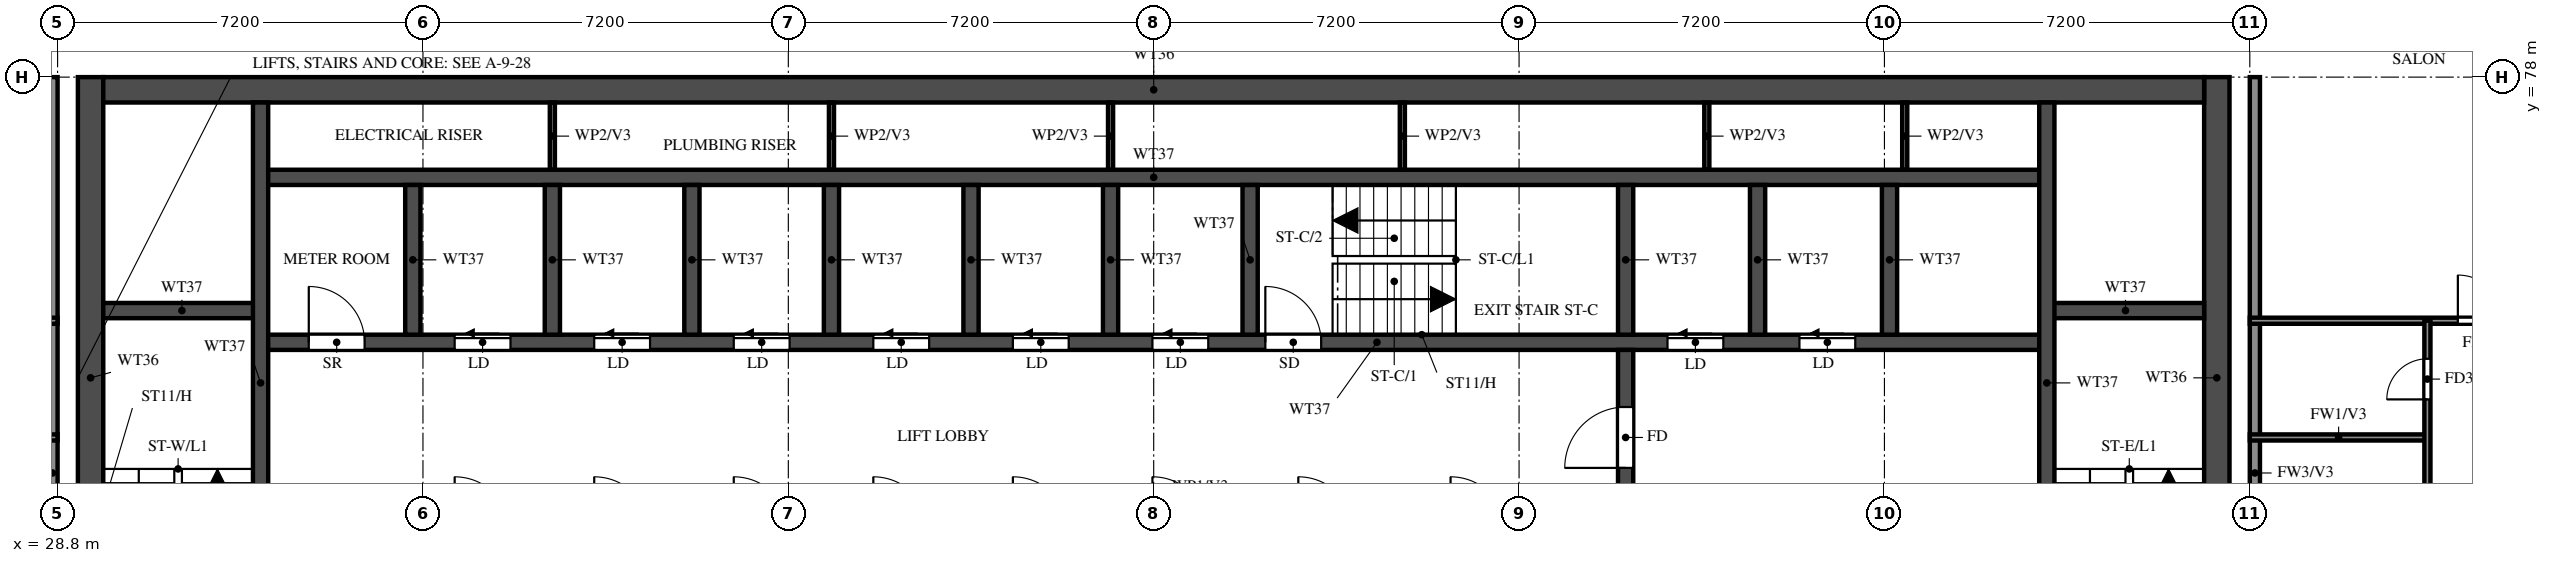
"""IFC4 building model, lengths in metres.
Left out: names, types, materials, properties, quantities, classifications, styles, units other than length and angle.
Written with IfcOpenShell. Run it as: python <this file> out.ifc"""

import sys

from ifc_helpers import new_model, si_unit, direction, frame, frame_2d, origin, place, context, subcontext, project, spatial, rectangle, extrude, element, fill, save


model = new_model("IFC4")
c1 = context("Model", 3, precision=1e-05, world=origin(), true_north=direction((0.0, 1.0)))
c2 = subcontext(c1, "Body", "Model", "MODEL_VIEW")
j1 = project(units=[si_unit("LENGTHUNIT", "METRE"), si_unit("PLANEANGLEUNIT", "RADIAN")], contexts=[c1])
p1 = place(None, origin())
s1 = spatial("IfcSite", under=j1, at=p1, CompositionType="ELEMENT")
p2 = place(p1, origin())
s2 = spatial("IfcBuilding", under=s1, at=p2, CompositionType="ELEMENT")
p3 = place(p2, frame((0.0, 0.0, 211.5)))
s3 = spatial("IfcBuildingStorey", under=s2, at=p3, CompositionType="ELEMENT", Elevation=211.5)
for number, where, z_axis, x_axis in (
    (1, (29.45, 66.15, 0.0), (0.0, 0.0, 1.0), (0.0, 1.0, 0.0)),
    (2, (71.35, 66.15, 0.0), (0.0, 0.0, 1.0), (0.0, 1.0, 0.0)),
):
    element("IfcWall", number, at=place(p3, frame(where, z_axis=z_axis, x_axis=x_axis)), inside=s3, PredefinedType="SHEAR", context=c2, shape_type="SweptSolid", body=[
        extrude(rectangle(XDim=11.85, YDim=0.5, at=frame_2d((5.925, 0.0))), origin(), (0.0, 0.0, 1.0), 3.22),
    ])
p4 = place(p3, frame((29.7, 77.75, 0.0), z_axis=(0.0, 0.0, 1.0), x_axis=(1.0, 0.0, 0.0)))
e3 = element("IfcWall", 3, at=p4, inside=s3, PredefinedType="SHEAR", context=c2, shape_type="SweptSolid", body=[
    extrude(rectangle(XDim=41.4, YDim=0.5, at=frame_2d((20.7, 0.0))), origin(), (0.0, 0.0, 1.0), 3.22),
])
p5 = place(p3, frame((32.8, 72.775, 0.0), z_axis=(0.0, 0.0, 1.0), x_axis=(1.0, 0.0, 0.0)))
e4 = element("IfcWall", 4, at=p5, inside=s3, PredefinedType="SHEAR", context=c2, shape_type="SweptSolid", body=[
    extrude(rectangle(XDim=35.2, YDim=0.3, at=frame_2d((17.6, 0.0))), origin(), (0.0, 0.0, 1.0), 3.22),
])
p6 = place(p5, frame((19.8, 0.0, 0.0)))
e5 = element("IfcOpeningElement", 5, at=p6, cuts=e4, PredefinedType="OPENING", context=c2, shape_type="SweptSolid", body=[
    extrude(rectangle(XDim=1.1, YDim=2.1, at=frame_2d((0.55, 1.05))), frame((0.0, 0.16, 0.0), z_axis=(0.0, -1.0, 0.0), x_axis=(1.0, 0.0, 0.0)), (0.0, 0.0, 1.0), 0.32),
])
p7 = place(p5, frame((27.725, 0.0, 0.0)))
e6 = element("IfcOpeningElement", 6, at=p7, cuts=e4, PredefinedType="OPENING", context=c2, shape_type="SweptSolid", body=[
    extrude(rectangle(XDim=1.1, YDim=2.1, at=frame_2d((0.55, 1.05))), frame((0.0, 0.16, 0.0), z_axis=(0.0, -1.0, 0.0), x_axis=(1.0, 0.0, 0.0)), (0.0, 0.0, 1.0), 0.32),
])
p8 = place(p5, frame((30.325, 0.0, 0.0)))
e7 = element("IfcOpeningElement", 7, at=p8, cuts=e4, PredefinedType="OPENING", context=c2, shape_type="SweptSolid", body=[
    extrude(rectangle(XDim=1.1, YDim=2.1, at=frame_2d((0.55, 1.05))), frame((0.0, 0.16, 0.0), z_axis=(0.0, -1.0, 0.0), x_axis=(1.0, 0.0, 0.0)), (0.0, 0.0, 1.0), 0.32),
])
p9 = place(p5, frame((3.825, 0.0, 0.0)))
e8 = element("IfcOpeningElement", 8, at=p9, cuts=e4, PredefinedType="OPENING", context=c2, shape_type="SweptSolid", body=[
    extrude(rectangle(XDim=1.1, YDim=2.1, at=frame_2d((0.55, 1.05))), frame((0.0, 0.16, 0.0), z_axis=(0.0, -1.0, 0.0), x_axis=(1.0, 0.0, 0.0)), (0.0, 0.0, 1.0), 0.32),
])
p10 = place(p5, frame((6.575, 0.0, 0.0)))
e9 = element("IfcOpeningElement", 9, at=p10, cuts=e4, PredefinedType="OPENING", context=c2, shape_type="SweptSolid", body=[
    extrude(rectangle(XDim=1.1, YDim=2.1, at=frame_2d((0.55, 1.05))), frame((0.0, 0.16, 0.0), z_axis=(0.0, -1.0, 0.0), x_axis=(1.0, 0.0, 0.0)), (0.0, 0.0, 1.0), 0.32),
])
p11 = place(p5, frame((9.325, 0.0, 0.0)))
e10 = element("IfcOpeningElement", 10, at=p11, cuts=e4, PredefinedType="OPENING", context=c2, shape_type="SweptSolid", body=[
    extrude(rectangle(XDim=1.1, YDim=2.1, at=frame_2d((0.55, 1.05))), frame((0.0, 0.16, 0.0), z_axis=(0.0, -1.0, 0.0), x_axis=(1.0, 0.0, 0.0)), (0.0, 0.0, 1.0), 0.32),
])
p12 = place(p5, frame((12.075, 0.0, 0.0)))
e11 = element("IfcOpeningElement", 11, at=p12, cuts=e4, PredefinedType="OPENING", context=c2, shape_type="SweptSolid", body=[
    extrude(rectangle(XDim=1.1, YDim=2.1, at=frame_2d((0.55, 1.05))), frame((0.0, 0.16, 0.0), z_axis=(0.0, -1.0, 0.0), x_axis=(1.0, 0.0, 0.0)), (0.0, 0.0, 1.0), 0.32),
])
p13 = place(p5, frame((14.825, 0.0, 0.0)))
e12 = element("IfcOpeningElement", 12, at=p13, cuts=e4, PredefinedType="OPENING", context=c2, shape_type="SweptSolid", body=[
    extrude(rectangle(XDim=1.1, YDim=2.1, at=frame_2d((0.55, 1.05))), frame((0.0, 0.16, 0.0), z_axis=(0.0, -1.0, 0.0), x_axis=(1.0, 0.0, 0.0)), (0.0, 0.0, 1.0), 0.32),
])
p14 = place(p5, frame((17.575, 0.0, 0.0)))
e13 = element("IfcOpeningElement", 13, at=p14, cuts=e4, PredefinedType="OPENING", context=c2, shape_type="SweptSolid", body=[
    extrude(rectangle(XDim=1.1, YDim=2.1, at=frame_2d((0.55, 1.05))), frame((0.0, 0.16, 0.0), z_axis=(0.0, -1.0, 0.0), x_axis=(1.0, 0.0, 0.0)), (0.0, 0.0, 1.0), 0.32),
])
p15 = place(p5, frame((0.95, 0.0, 0.0)))
e14 = element("IfcOpeningElement", 14, at=p15, cuts=e4, PredefinedType="OPENING", context=c2, shape_type="SweptSolid", body=[
    extrude(rectangle(XDim=1.1, YDim=2.1, at=frame_2d((0.55, 1.05))), frame((0.0, 0.16, 0.0), z_axis=(0.0, -1.0, 0.0), x_axis=(1.0, 0.0, 0.0)), (0.0, 0.0, 1.0), 0.32),
])
p16 = place(p3, frame((32.8, 76.025, 0.0), z_axis=(0.0, 0.0, 1.0), x_axis=(1.0, 0.0, 0.0)))
e15 = element("IfcWall", 15, at=p16, inside=s3, PredefinedType="SHEAR", context=c2, shape_type="SweptSolid", body=[
    extrude(rectangle(XDim=35.2, YDim=0.3, at=frame_2d((17.6, 0.0))), origin(), (0.0, 0.0, 1.0), 3.22),
])
for number, where, z_axis, x_axis in (
    (16, (29.7, 73.4, 0.0), (0.0, 0.0, 1.0), (1.0, 0.0, 0.0)),
    (17, (68.0, 73.4, 0.0), (0.0, 0.0, 1.0), (1.0, 0.0, 0.0)),
):
    element("IfcWall", number, at=place(p3, frame(where, z_axis=z_axis, x_axis=x_axis)), inside=s3, PredefinedType="SHEAR", context=c2, shape_type="SweptSolid", body=[
        extrude(rectangle(XDim=3.1, YDim=0.3, at=frame_2d((1.55, 0.0))), origin(), (0.0, 0.0, 1.0), 3.22),
    ])
p17 = place(p3, frame((32.8, 66.45, 0.0), z_axis=(0.0, 0.0, 1.0), x_axis=(0.0, 1.0, 0.0)))
e18 = element("IfcWall", 18, at=p17, inside=s3, PredefinedType="SHEAR", context=c2, shape_type="SweptSolid", body=[
    extrude(rectangle(XDim=11.05, YDim=0.3, at=frame_2d((5.525, 0.0))), origin(), (0.0, 0.0, 1.0), 3.22),
])
p18 = place(p3, frame((68.0, 66.45, 0.0), z_axis=(0.0, 0.0, 1.0), x_axis=(0.0, 1.0, 0.0)))
e19 = element("IfcWall", 19, at=p18, inside=s3, PredefinedType="SHEAR", context=c2, shape_type="SweptSolid", body=[
    extrude(rectangle(XDim=11.05, YDim=0.3, at=frame_2d((5.525, 0.0))), origin(), (0.0, 0.0, 1.0), 3.22),
])
p19 = place(p18, frame((0.15, 0.0, 0.0)))
e20 = element("IfcOpeningElement", 20, at=p19, cuts=e19, PredefinedType="OPENING", context=c2, shape_type="SweptSolid", body=[
    extrude(rectangle(XDim=1.1, YDim=2.1, at=frame_2d((0.55, 1.05))), frame((0.0, 0.16, 0.0), z_axis=(0.0, -1.0, 0.0), x_axis=(1.0, 0.0, 0.0)), (0.0, 0.0, 1.0), 0.32),
])
p20 = place(p3, frame((59.7, 66.45, 0.0), z_axis=(0.0, 0.0, 1.0), x_axis=(0.0, 1.0, 0.0)))
e21 = element("IfcWall", 21, at=p20, inside=s3, PredefinedType="SHEAR", context=c2, shape_type="SweptSolid", body=[
    extrude(rectangle(XDim=6.175, YDim=0.3, at=frame_2d((3.087, 0.0))), origin(), (0.0, 0.0, 1.0), 3.22),
])
p21 = place(p20, frame((3.85, 0.0, 0.0)))
e22 = element("IfcOpeningElement", 22, at=p21, cuts=e21, PredefinedType="OPENING", context=c2, shape_type="SweptSolid", body=[
    extrude(rectangle(XDim=1.2, YDim=2.1, at=frame_2d((0.6, 1.05))), frame((0.0, 0.16, 0.0), z_axis=(0.0, -1.0, 0.0), x_axis=(1.0, 0.0, 0.0)), (0.0, 0.0, 1.0), 0.32),
])
for number, where, z_axis, x_axis in (
    (23, (59.7, 72.925, 0.0), (0.0, 0.0, 1.0), (0.0, 1.0, 0.0)),
    (24, (35.8, 72.925, 0.0), (0.0, 0.0, 1.0), (0.0, 1.0, 0.0)),
    (25, (38.55, 72.925, 0.0), (0.0, 0.0, 1.0), (0.0, 1.0, 0.0)),
    (26, (41.3, 72.925, 0.0), (0.0, 0.0, 1.0), (0.0, 1.0, 0.0)),
    (27, (44.05, 72.925, 0.0), (0.0, 0.0, 1.0), (0.0, 1.0, 0.0)),
    (28, (46.8, 72.925, 0.0), (0.0, 0.0, 1.0), (0.0, 1.0, 0.0)),
    (29, (49.55, 72.925, 0.0), (0.0, 0.0, 1.0), (0.0, 1.0, 0.0)),
    (30, (52.3, 72.925, 0.0), (0.0, 0.0, 1.0), (0.0, 1.0, 0.0)),
    (31, (62.3, 72.925, 0.0), (0.0, 0.0, 1.0), (0.0, 1.0, 0.0)),
    (32, (64.9, 72.925, 0.0), (0.0, 0.0, 1.0), (0.0, 1.0, 0.0)),
):
    element("IfcWall", number, at=place(p3, frame(where, z_axis=z_axis, x_axis=x_axis)), inside=s3, PredefinedType="SHEAR", context=c2, shape_type="SweptSolid", body=[
        extrude(rectangle(XDim=2.95, YDim=0.3, at=frame_2d((1.475, 0.0))), origin(), (0.0, 0.0, 1.0), 3.22),
    ])
for number, where, z_axis, x_axis in (
    (33, (38.55, 76.175, 0.0), (0.0, 0.0, 1.0), (0.0, 1.0, 0.0)),
    (34, (44.05, 76.175, 0.0), (0.0, 0.0, 1.0), (0.0, 1.0, 0.0)),
    (35, (49.55, 76.175, 0.0), (0.0, 0.0, 1.0), (0.0, 1.0, 0.0)),
    (36, (55.3, 76.175, 0.0), (0.0, 0.0, 1.0), (0.0, 1.0, 0.0)),
    (37, (61.3, 76.175, 0.0), (0.0, 0.0, 1.0), (0.0, 1.0, 0.0)),
    (38, (65.2, 76.175, 0.0), (0.0, 0.0, 1.0), (0.0, 1.0, 0.0)),
):
    element("IfcWall", number, at=place(p3, frame(where, z_axis=z_axis, x_axis=x_axis)), inside=s3, PredefinedType="PARTITIONING", context=c2, shape_type="SweptSolid", body=[
        extrude(rectangle(XDim=1.325, YDim=0.1, at=frame_2d((0.663, 0.0))), origin(), (0.0, 0.0, 1.0), 3.22),
    ])
for number, where, z_axis, x_axis in (
    (39, (28.7, 62.4, 0.0), (0.0, 0.0, 1.0), (0.0, 1.0, 0.0)),
    (40, (72.1, 62.4, 0.0), (0.0, 0.0, 1.0), (0.0, 1.0, 0.0)),
):
    element("IfcWall", number, at=place(p3, frame(where, z_axis=z_axis, x_axis=x_axis)), inside=s3, PredefinedType="SOLIDWALL", context=c2, shape_type="SweptSolid", body=[
        extrude(rectangle(XDim=15.6, YDim=0.2, at=frame_2d((7.8, 0.0))), origin(), (0.0, 0.0, 1.0), 3.22),
    ])
for number, where, z_axis, x_axis in (
    (41, (25.3, 70.9, 0.0), (0.0, 0.0, 1.0), (1.0, 0.0, 0.0)),
    (42, (72.0, 70.9, 0.0), (0.0, 0.0, 1.0), (1.0, 0.0, 0.0)),
):
    element("IfcWall", number, at=place(p3, frame(where, z_axis=z_axis, x_axis=x_axis)), inside=s3, PredefinedType="PARTITIONING", context=c2, shape_type="SweptSolid", body=[
        extrude(rectangle(XDim=3.5, YDim=0.12, at=frame_2d((1.75, 0.0))), origin(), (0.0, 0.0, 1.0), 3.22),
    ])
p22 = place(p3, frame((18.525, 73.2, 0.0), z_axis=(0.0, 0.0, 1.0), x_axis=(1.0, 0.0, 0.0)))
e43 = element("IfcWall", 43, at=p22, inside=s3, PredefinedType="PARTITIONING", context=c2, shape_type="SweptSolid", body=[
    extrude(rectangle(XDim=10.275, YDim=0.12, at=frame_2d((5.138, 0.0))), origin(), (0.0, 0.0, 1.0), 2.32),
])
p23 = place(p22, frame((5.275, 0.0, 0.0)))
e44 = element("IfcOpeningElement", 44, at=p23, cuts=e43, PredefinedType="OPENING", context=c2, shape_type="SweptSolid", body=[
    extrude(rectangle(XDim=0.9, YDim=2.1, at=frame_2d((0.45, 1.05))), frame((0.0, 0.07, 0.0), z_axis=(0.0, -1.0, 0.0), x_axis=(1.0, 0.0, 0.0)), (0.0, 0.0, 1.0), 0.14),
])
p24 = place(p3, frame((72.0, 73.2, 0.0), z_axis=(0.0, 0.0, 1.0), x_axis=(1.0, 0.0, 0.0)))
e45 = element("IfcWall", 45, at=p24, inside=s3, PredefinedType="PARTITIONING", context=c2, shape_type="SweptSolid", body=[
    extrude(rectangle(XDim=10.275, YDim=0.12, at=frame_2d((5.137, 0.0))), origin(), (0.0, 0.0, 1.0), 2.32),
])
p25 = place(p24, frame((4.1, 0.0, 0.0)))
e46 = element("IfcOpeningElement", 46, at=p25, cuts=e45, PredefinedType="OPENING", context=c2, shape_type="SweptSolid", body=[
    extrude(rectangle(XDim=0.9, YDim=2.1, at=frame_2d((0.45, 1.05))), frame((0.0, 0.07, 0.0), z_axis=(0.0, -1.0, 0.0), x_axis=(1.0, 0.0, 0.0)), (0.0, 0.0, 1.0), 0.14),
])
p26 = place(p3, frame((75.5, 61.2, 0.0), z_axis=(0.0, 0.0, 1.0), x_axis=(0.0, 1.0, 0.0)))
e47 = element("IfcWall", 47, at=p26, inside=s3, PredefinedType="PARTITIONING", context=c2, shape_type="SweptSolid", body=[
    extrude(rectangle(XDim=12.0, YDim=0.12, at=frame_2d((6.0, 0.0))), origin(), (0.0, 0.0, 1.0), 3.22),
])
p27 = place(p26, frame((4.2, 0.0, 0.0)))
e48 = element("IfcOpeningElement", 48, at=p27, cuts=e47, PredefinedType="OPENING", context=c2, shape_type="SweptSolid", body=[
    extrude(rectangle(XDim=0.9, YDim=2.1, at=frame_2d((0.45, 1.05))), frame((0.0, 0.07, 0.0), z_axis=(0.0, -1.0, 0.0), x_axis=(1.0, 0.0, 0.0)), (0.0, 0.0, 1.0), 0.14),
])
p28 = place(p26, frame((7.975, 0.0, 0.0)))
e49 = element("IfcOpeningElement", 49, at=p28, cuts=e47, PredefinedType="OPENING", context=c2, shape_type="SweptSolid", body=[
    extrude(rectangle(XDim=0.8, YDim=2.1, at=frame_2d((0.4, 1.05))), frame((0.0, 0.07, 0.0), z_axis=(0.0, -1.0, 0.0), x_axis=(1.0, 0.0, 0.0)), (0.0, 0.0, 1.0), 0.14),
])
p29 = place(p26, frame((10.45, 0.0, 0.0)))
e50 = element("IfcOpeningElement", 50, at=p29, cuts=e47, PredefinedType="OPENING", context=c2, shape_type="SweptSolid", body=[
    extrude(rectangle(XDim=0.8, YDim=2.1, at=frame_2d((0.4, 1.05))), frame((0.0, 0.07, 0.0), z_axis=(0.0, -1.0, 0.0), x_axis=(1.0, 0.0, 0.0)), (0.0, 0.0, 1.0), 0.14),
])
p30 = place(p6, origin())
e51 = element("IfcDoor", 51, at=p30, inside=s3, OperationType="SINGLE_SWING_LEFT", PredefinedType="DOOR", context=c2, shape_type="SweptSolid", body=[
    extrude(rectangle(XDim=1.1, YDim=2.1, at=frame_2d((0.55, 1.05))), frame((0.0, 0.025, 0.0), z_axis=(0.0, -1.0, 0.0), x_axis=(1.0, 0.0, 0.0)), (0.0, 0.0, 1.0), 0.05),
])
fill(e5, e51)
p31 = place(p21, origin())
e52 = element("IfcDoor", 52, at=p31, inside=s3, OperationType="SINGLE_SWING_LEFT", PredefinedType="DOOR", context=c2, shape_type="SweptSolid", body=[
    extrude(rectangle(XDim=1.2, YDim=2.1, at=frame_2d((0.6, 1.05))), frame((0.0, 0.025, 0.0), z_axis=(0.0, -1.0, 0.0), x_axis=(1.0, 0.0, 0.0)), (0.0, 0.0, 1.0), 0.05),
])
fill(e22, e52)
p32 = place(p7, origin())
e53 = element("IfcDoor", 53, at=p32, inside=s3, OperationType="SLIDING_TO_LEFT", PredefinedType="DOOR", context=c2, shape_type="SweptSolid", body=[
    extrude(rectangle(XDim=1.1, YDim=2.1, at=frame_2d((0.55, 1.05))), frame((0.0, 0.025, 0.0), z_axis=(0.0, -1.0, 0.0), x_axis=(1.0, 0.0, 0.0)), (0.0, 0.0, 1.0), 0.05),
])
fill(e6, e53)
p33 = place(p8, origin())
e54 = element("IfcDoor", 54, at=p33, inside=s3, OperationType="SLIDING_TO_LEFT", PredefinedType="DOOR", context=c2, shape_type="SweptSolid", body=[
    extrude(rectangle(XDim=1.1, YDim=2.1, at=frame_2d((0.55, 1.05))), frame((0.0, 0.025, 0.0), z_axis=(0.0, -1.0, 0.0), x_axis=(1.0, 0.0, 0.0)), (0.0, 0.0, 1.0), 0.05),
])
fill(e7, e54)
p34 = place(p9, origin())
e55 = element("IfcDoor", 55, at=p34, inside=s3, OperationType="SLIDING_TO_LEFT", PredefinedType="DOOR", context=c2, shape_type="SweptSolid", body=[
    extrude(rectangle(XDim=1.1, YDim=2.1, at=frame_2d((0.55, 1.05))), frame((0.0, 0.025, 0.0), z_axis=(0.0, -1.0, 0.0), x_axis=(1.0, 0.0, 0.0)), (0.0, 0.0, 1.0), 0.05),
])
fill(e8, e55)
p35 = place(p10, origin())
e56 = element("IfcDoor", 56, at=p35, inside=s3, OperationType="SLIDING_TO_LEFT", PredefinedType="DOOR", context=c2, shape_type="SweptSolid", body=[
    extrude(rectangle(XDim=1.1, YDim=2.1, at=frame_2d((0.55, 1.05))), frame((0.0, 0.025, 0.0), z_axis=(0.0, -1.0, 0.0), x_axis=(1.0, 0.0, 0.0)), (0.0, 0.0, 1.0), 0.05),
])
fill(e9, e56)
p36 = place(p11, origin())
e57 = element("IfcDoor", 57, at=p36, inside=s3, OperationType="SLIDING_TO_LEFT", PredefinedType="DOOR", context=c2, shape_type="SweptSolid", body=[
    extrude(rectangle(XDim=1.1, YDim=2.1, at=frame_2d((0.55, 1.05))), frame((0.0, 0.025, 0.0), z_axis=(0.0, -1.0, 0.0), x_axis=(1.0, 0.0, 0.0)), (0.0, 0.0, 1.0), 0.05),
])
fill(e10, e57)
p37 = place(p12, origin())
e58 = element("IfcDoor", 58, at=p37, inside=s3, OperationType="SLIDING_TO_LEFT", PredefinedType="DOOR", context=c2, shape_type="SweptSolid", body=[
    extrude(rectangle(XDim=1.1, YDim=2.1, at=frame_2d((0.55, 1.05))), frame((0.0, 0.025, 0.0), z_axis=(0.0, -1.0, 0.0), x_axis=(1.0, 0.0, 0.0)), (0.0, 0.0, 1.0), 0.05),
])
fill(e11, e58)
p38 = place(p13, origin())
e59 = element("IfcDoor", 59, at=p38, inside=s3, OperationType="SLIDING_TO_LEFT", PredefinedType="DOOR", context=c2, shape_type="SweptSolid", body=[
    extrude(rectangle(XDim=1.1, YDim=2.1, at=frame_2d((0.55, 1.05))), frame((0.0, 0.025, 0.0), z_axis=(0.0, -1.0, 0.0), x_axis=(1.0, 0.0, 0.0)), (0.0, 0.0, 1.0), 0.05),
])
fill(e12, e59)
p39 = place(p14, origin())
e60 = element("IfcDoor", 60, at=p39, inside=s3, OperationType="SLIDING_TO_LEFT", PredefinedType="DOOR", context=c2, shape_type="SweptSolid", body=[
    extrude(rectangle(XDim=1.1, YDim=2.1, at=frame_2d((0.55, 1.05))), frame((0.0, 0.025, 0.0), z_axis=(0.0, -1.0, 0.0), x_axis=(1.0, 0.0, 0.0)), (0.0, 0.0, 1.0), 0.05),
])
fill(e13, e60)
p40 = place(p15, origin())
e61 = element("IfcDoor", 61, at=p40, inside=s3, OperationType="SINGLE_SWING_LEFT", PredefinedType="DOOR", context=c2, shape_type="SweptSolid", body=[
    extrude(rectangle(XDim=1.1, YDim=2.1, at=frame_2d((0.55, 1.05))), frame((0.0, 0.025, 0.0), z_axis=(0.0, -1.0, 0.0), x_axis=(1.0, 0.0, 0.0)), (0.0, 0.0, 1.0), 0.05),
])
fill(e14, e61)
p41 = place(p25, origin())
e62 = element("IfcDoor", 62, at=p41, inside=s3, OperationType="SINGLE_SWING_RIGHT", PredefinedType="DOOR", context=c2, shape_type="SweptSolid", body=[
    extrude(rectangle(XDim=0.9, YDim=2.1, at=frame_2d((0.45, 1.05))), frame((0.0, 0.025, 0.0), z_axis=(0.0, -1.0, 0.0), x_axis=(1.0, 0.0, 0.0)), (0.0, 0.0, 1.0), 0.05),
])
fill(e46, e62)
p42 = place(p29, origin())
e63 = element("IfcDoor", 63, at=p42, inside=s3, OperationType="SINGLE_SWING_LEFT", PredefinedType="DOOR", context=c2, shape_type="SweptSolid", body=[
    extrude(rectangle(XDim=0.8, YDim=2.1, at=frame_2d((0.4, 1.05))), frame((0.0, 0.025, 0.0), z_axis=(0.0, -1.0, 0.0), x_axis=(1.0, 0.0, 0.0)), (0.0, 0.0, 1.0), 0.05),
])
fill(e50, e63)
save(model, sys.argv[1])
